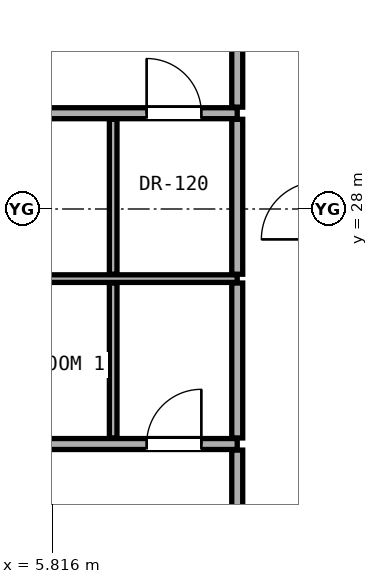
"""IFC4 building model, lengths in metres.
Left out: names, types, materials, properties, quantities, classifications, styles, units other than length and angle.
Written with IfcOpenShell. Run it as: python <this file> out.ifc"""

import sys

from ifc_helpers import new_model, si_unit, direction, frame, frame_2d, origin, place, context, subcontext, project, spatial, rectangle, extrude, element, fill, save


model = new_model("IFC4")
c1 = context("Model", 3, precision=1e-05, world=origin(), true_north=direction((0.0, 1.0)))
c2 = subcontext(c1, "Body", "Model", "MODEL_VIEW")
j1 = project(units=[si_unit("LENGTHUNIT", "METRE"), si_unit("PLANEANGLEUNIT", "RADIAN")], contexts=[c1])
p1 = place(None, origin())
s1 = spatial("IfcSite", under=j1, at=p1, CompositionType="ELEMENT")
p2 = place(p1, origin())
s2 = spatial("IfcBuilding", under=s1, at=p2, CompositionType="ELEMENT")
p3 = place(p2, frame((0.0, 0.0, 62.0)))
s3 = spatial("IfcBuildingStorey", under=s2, at=p3, CompositionType="ELEMENT", Elevation=62.0)
p4 = place(p3, frame((-0.92, 24.135, 0.0), z_axis=(0.0, 0.0, 1.0), x_axis=(1.0, 0.0, 0.0)))
e1 = element("IfcWall", 1, at=p4, inside=s3, PredefinedType="PARTITIONING", context=c2, shape_type="SweptSolid", body=[
    extrude(rectangle(XDim=9.78, YDim=0.18, at=frame_2d((4.89, 0.0))), origin(), (0.0, 0.0, 1.0), 2.125),
])
p5 = place(p4, frame((3.765, 0.0, 0.0)))
e2 = element("IfcOpeningElement", 2, at=p5, cuts=e1, PredefinedType="OPENING", context=c2, shape_type="SweptSolid", body=[
    extrude(rectangle(XDim=0.85, YDim=2.01, at=frame_2d((0.425, 1.005))), frame((0.0, 0.1, 0.0), z_axis=(0.0, -1.0, 0.0), x_axis=(1.0, 0.0, 0.0)), (0.0, 0.0, 1.0), 0.2),
])
p6 = place(p4, frame((8.29, 0.0, 0.0)))
e3 = element("IfcOpeningElement", 3, at=p6, cuts=e1, PredefinedType="OPENING", context=c2, shape_type="SweptSolid", body=[
    extrude(rectangle(XDim=0.9, YDim=2.1, at=frame_2d((0.45, 1.05))), frame((0.0, 0.1, 0.0), z_axis=(0.0, -1.0, 0.0), x_axis=(1.0, 0.0, 0.0)), (0.0, 0.0, 1.0), 0.2),
])
p7 = place(p3, frame((-0.92, 26.855, 0.0), z_axis=(0.0, 0.0, 1.0), x_axis=(1.0, 0.0, 0.0)))
e4 = element("IfcWall", 4, at=p7, inside=s3, PredefinedType="PARTITIONING", context=c2, shape_type="SweptSolid", body=[
    extrude(rectangle(XDim=9.78, YDim=0.125, at=frame_2d((4.89, 0.0))), origin(), (0.0, 0.0, 1.0), 2.125),
])
p8 = place(p3, frame((-0.92, 29.575, 0.0), z_axis=(0.0, 0.0, 1.0), x_axis=(1.0, 0.0, 0.0)))
e5 = element("IfcWall", 5, at=p8, inside=s3, PredefinedType="PARTITIONING", context=c2, shape_type="SweptSolid", body=[
    extrude(rectangle(XDim=9.78, YDim=0.18, at=frame_2d((4.89, 0.0))), origin(), (0.0, 0.0, 1.0), 2.125),
])
p9 = place(p8, frame((3.765, 0.0, 0.0)))
e6 = element("IfcOpeningElement", 6, at=p9, cuts=e5, PredefinedType="OPENING", context=c2, shape_type="SweptSolid", body=[
    extrude(rectangle(XDim=0.85, YDim=2.01, at=frame_2d((0.425, 1.005))), frame((0.0, 0.1, 0.0), z_axis=(0.0, -1.0, 0.0), x_axis=(1.0, 0.0, 0.0)), (0.0, 0.0, 1.0), 0.2),
])
p10 = place(p8, frame((8.29, 0.0, 0.0)))
e7 = element("IfcOpeningElement", 7, at=p10, cuts=e5, PredefinedType="OPENING", context=c2, shape_type="SweptSolid", body=[
    extrude(rectangle(XDim=0.9, YDim=2.1, at=frame_2d((0.45, 1.05))), frame((0.0, 0.1, 0.0), z_axis=(0.0, -1.0, 0.0), x_axis=(1.0, 0.0, 0.0)), (0.0, 0.0, 1.0), 0.2),
])
p11 = place(p3, frame((6.82, 24.235, 0.0), z_axis=(0.0, 0.0, 1.0), x_axis=(0.0, 1.0, 0.0)))
e8 = element("IfcWall", 8, at=p11, inside=s3, PredefinedType="PARTITIONING", context=c2, shape_type="SweptSolid", body=[
    extrude(rectangle(XDim=2.547, YDim=0.125, at=frame_2d((1.274, 0.0))), origin(), (0.0, 0.0, 1.0), 2.279),
])
p12 = place(p3, frame((6.82, 26.927, 0.0), z_axis=(0.0, 0.0, 1.0), x_axis=(0.0, 1.0, 0.0)))
e9 = element("IfcWall", 9, at=p12, inside=s3, PredefinedType="PARTITIONING", context=c2, shape_type="SweptSolid", body=[
    extrude(rectangle(XDim=2.548, YDim=0.125, at=frame_2d((1.274, 0.0))), origin(), (0.0, 0.0, 1.0), 3.06),
])
p13 = place(p3, frame((8.86, 14.406, 0.0), z_axis=(0.0, 0.0, 1.0), x_axis=(0.0, 1.0, 0.0)))
e10 = element("IfcWall", 10, at=p13, inside=s3, PredefinedType="PARTITIONING", context=c2, shape_type="SweptSolid", body=[
    extrude(rectangle(XDim=9.629, YDim=0.18, at=frame_2d((4.814, 0.0))), origin(), (0.0, 0.0, 1.0), 2.436),
])
p14 = place(p13, frame((4.29, 0.0, 0.0)))
e11 = element("IfcOpeningElement", 11, at=p14, cuts=e10, PredefinedType="OPENING", context=c2, shape_type="SweptSolid", body=[
    extrude(rectangle(XDim=1.05, YDim=2.2, at=frame_2d((0.525, 1.1))), frame((0.0, 0.1, 0.0), z_axis=(0.0, -1.0, 0.0), x_axis=(1.0, 0.0, 0.0)), (0.0, 0.0, 1.0), 0.2),
])
p15 = place(p3, frame((8.86, 24.235, 0.0), z_axis=(0.0, 0.0, 1.0), x_axis=(0.0, 1.0, 0.0)))
e12 = element("IfcWall", 12, at=p15, inside=s3, PredefinedType="PARTITIONING", context=c2, shape_type="SweptSolid", body=[
    extrude(rectangle(XDim=2.547, YDim=0.18, at=frame_2d((1.274, 0.0))), origin(), (0.0, 0.0, 1.0), 2.279),
])
p16 = place(p3, frame((8.86, 26.927, 0.0), z_axis=(0.0, 0.0, 1.0), x_axis=(0.0, 1.0, 0.0)))
e13 = element("IfcWall", 13, at=p16, inside=s3, PredefinedType="PARTITIONING", context=c2, shape_type="SweptSolid", body=[
    extrude(rectangle(XDim=2.548, YDim=0.18, at=frame_2d((1.274, 0.0))), origin(), (0.0, 0.0, 1.0), 3.06),
])
p17 = place(p3, frame((8.86, 29.675, 0.0), z_axis=(0.0, 0.0, 1.0), x_axis=(0.0, 1.0, 0.0)))
e14 = element("IfcWall", 14, at=p17, inside=s3, PredefinedType="PARTITIONING", context=c2, shape_type="SweptSolid", body=[
    extrude(rectangle(XDim=11.919, YDim=0.18, at=frame_2d((5.959, 0.0))), origin(), (0.0, 0.0, 1.0), 2.279),
])
p18 = place(p17, frame((5.435, 0.0, 0.0)))
e15 = element("IfcOpeningElement", 15, at=p18, cuts=e14, PredefinedType="OPENING", context=c2, shape_type="SweptSolid", body=[
    extrude(rectangle(XDim=1.05, YDim=2.2, at=frame_2d((0.525, 1.1))), frame((0.0, 0.1, 0.0), z_axis=(0.0, -1.0, 0.0), x_axis=(1.0, 0.0, 0.0)), (0.0, 0.0, 1.0), 0.2),
])
p19 = place(p6, origin())
e16 = element("IfcDoor", 16, at=p19, inside=s3, OperationType="SINGLE_SWING_RIGHT", PredefinedType="DOOR", context=c2, shape_type="SweptSolid", body=[
    extrude(rectangle(XDim=0.9, YDim=2.1, at=frame_2d((0.45, 1.05))), frame((0.0, 0.025, 0.0), z_axis=(0.0, -1.0, 0.0), x_axis=(1.0, 0.0, 0.0)), (0.0, 0.0, 1.0), 0.05),
])
fill(e3, e16)
p20 = place(p10, origin())
e17 = element("IfcDoor", 17, at=p20, inside=s3, OperationType="SINGLE_SWING_LEFT", PredefinedType="DOOR", context=c2, shape_type="SweptSolid", body=[
    extrude(rectangle(XDim=0.9, YDim=2.1, at=frame_2d((0.45, 1.05))), frame((0.0, 0.025, 0.0), z_axis=(0.0, -1.0, 0.0), x_axis=(1.0, 0.0, 0.0)), (0.0, 0.0, 1.0), 0.05),
])
fill(e7, e17)
save(model, sys.argv[1])
